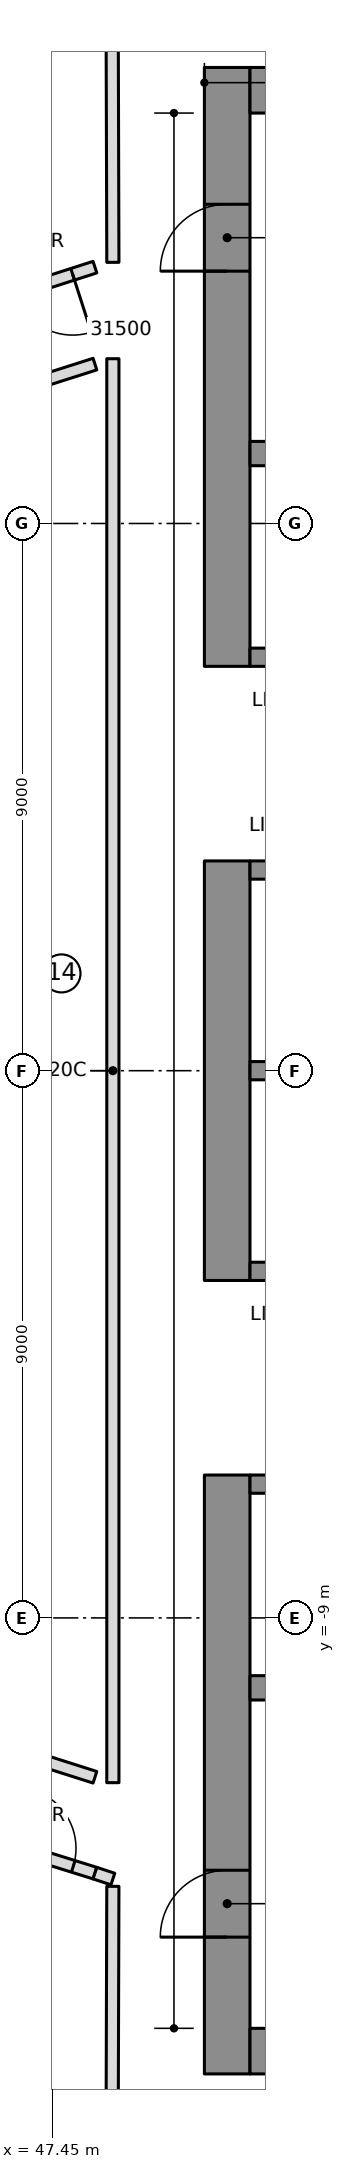
"""IFC4 building model, lengths in metres.
Left out: names, types, materials, properties, quantities, classifications, styles, units other than length and angle.
Written with IfcOpenShell. Run it as: python <this file> out.ifc"""

import sys

from ifc_helpers import new_model, si_unit, direction, frame, frame_2d, origin, place, context, subcontext, project, spatial, rectangle, extrude, element, fill, save


model = new_model("IFC4")
c1 = context("Model", 3, precision=1e-05, world=origin(), true_north=direction((0.0, 1.0)))
c2 = subcontext(c1, "Body", "Model", "MODEL_VIEW")
j1 = project(units=[si_unit("LENGTHUNIT", "METRE"), si_unit("PLANEANGLEUNIT", "RADIAN")], contexts=[c1])
p1 = place(None, origin())
s1 = spatial("IfcSite", under=j1, at=p1, CompositionType="ELEMENT")
p2 = place(p1, origin())
s2 = spatial("IfcBuilding", under=s1, at=p2, CompositionType="ELEMENT")
p3 = place(p2, frame((0.0, 0.0, 193.25)))
s3 = spatial("IfcBuildingStorey", under=s2, at=p3, CompositionType="ELEMENT", Elevation=193.25)
p4 = place(p3, frame((50.325, 6.65, 0.0), z_axis=(0.0, 0.0, 1.0), x_axis=(0.0, 1.0, 0.0)))
e1 = element("IfcWall", 1, at=p4, inside=s3, PredefinedType="SHEAR", context=c2, shape_type="SweptSolid", body=[
    extrude(rectangle(XDim=9.85, YDim=0.75, at=frame_2d((4.925, 0.0))), origin(), (0.0, 0.0, 1.0), 3.55),
])
p5 = place(p4, frame((6.5, 0.0, 0.0)))
e2 = element("IfcOpeningElement", 2, at=p5, cuts=e1, PredefinedType="OPENING", context=c2, shape_type="SweptSolid", body=[
    extrude(rectangle(XDim=1.1, YDim=2.1, at=frame_2d((0.55, 1.05))), frame((0.0, 0.385, 0.0), z_axis=(0.0, -1.0, 0.0), x_axis=(1.0, 0.0, 0.0)), (0.0, 0.0, 1.0), 0.77),
])
p6 = place(p3, frame((50.325, -3.45, 0.0), z_axis=(0.0, 0.0, 1.0), x_axis=(0.0, 1.0, 0.0)))
e3 = element("IfcWall", 3, at=p6, inside=s3, PredefinedType="SHEAR", context=c2, shape_type="SweptSolid", body=[
    extrude(rectangle(XDim=6.9, YDim=0.75, at=frame_2d((3.45, 0.0))), origin(), (0.0, 0.0, 1.0), 3.55),
])
p7 = place(p3, frame((50.325, -16.5, 0.0), z_axis=(0.0, 0.0, 1.0), x_axis=(0.0, 1.0, 0.0)))
e4 = element("IfcWall", 4, at=p7, inside=s3, PredefinedType="SHEAR", context=c2, shape_type="SweptSolid", body=[
    extrude(rectangle(XDim=9.85, YDim=0.75, at=frame_2d((4.925, 0.0))), origin(), (0.0, 0.0, 1.0), 3.55),
])
p8 = place(p7, frame((2.25, 0.0, 0.0)))
e5 = element("IfcOpeningElement", 5, at=p8, cuts=e4, PredefinedType="OPENING", context=c2, shape_type="SweptSolid", body=[
    extrude(rectangle(XDim=1.1, YDim=2.1, at=frame_2d((0.55, 1.05))), frame((0.0, 0.385, 0.0), z_axis=(0.0, -1.0, 0.0), x_axis=(1.0, 0.0, 0.0)), (0.0, 0.0, 1.0), 0.77),
])
for number, where, z_axis, x_axis in (
    (6, (50.7, 16.125, 0.0), (0.0, 0.0, 1.0), (1.0, 0.0, 0.0)),
    (7, (50.7, -16.125, 0.0), (0.0, 0.0, 1.0), (1.0, 0.0, 0.0)),
):
    element("IfcWall", number, at=place(p3, frame(where, z_axis=z_axis, x_axis=x_axis)), inside=s3, PredefinedType="SHEAR", context=c2, shape_type="SweptSolid", body=[
        extrude(rectangle(XDim=13.77, YDim=0.75, at=frame_2d((6.885, 0.0))), origin(), (0.0, 0.0, 1.0), 3.55),
    ])
p9 = place(p3, frame((50.7, 10.15, 0.0), z_axis=(0.0, 0.0, 1.0), x_axis=(1.0, 0.0, 0.0)))
e8 = element("IfcWall", 8, at=p9, inside=s3, PredefinedType="SHEAR", context=c2, shape_type="SweptSolid", body=[
    extrude(rectangle(XDim=13.02, YDim=0.4, at=frame_2d((6.51, 0.0))), origin(), (0.0, 0.0, 1.0), 3.55),
])
p10 = place(p9, frame((0.7, 0.0, 0.0)))
e9 = element("IfcOpeningElement", 9, at=p10, cuts=e8, PredefinedType="OPENING", context=c2, shape_type="SweptSolid", body=[
    extrude(rectangle(XDim=1.1, YDim=2.1, at=frame_2d((0.55, 1.05))), frame((0.0, 0.21, 0.0), z_axis=(0.0, -1.0, 0.0), x_axis=(1.0, 0.0, 0.0)), (0.0, 0.0, 1.0), 0.42),
])
p11 = place(p9, frame((3.5, 0.0, 0.0)))
e10 = element("IfcOpeningElement", 10, at=p11, cuts=e8, PredefinedType="OPENING", context=c2, shape_type="SweptSolid", body=[
    extrude(rectangle(XDim=1.1, YDim=2.1, at=frame_2d((0.55, 1.05))), frame((0.0, 0.21, 0.0), z_axis=(0.0, -1.0, 0.0), x_axis=(1.0, 0.0, 0.0)), (0.0, 0.0, 1.0), 0.42),
])
p12 = place(p3, frame((50.7, -10.15, 0.0), z_axis=(0.0, 0.0, 1.0), x_axis=(1.0, 0.0, 0.0)))
e11 = element("IfcWall", 11, at=p12, inside=s3, PredefinedType="SHEAR", context=c2, shape_type="SweptSolid", body=[
    extrude(rectangle(XDim=13.02, YDim=0.4, at=frame_2d((6.51, 0.0))), origin(), (0.0, 0.0, 1.0), 3.55),
])
p13 = place(p3, frame((50.7, 0.0, 0.0), z_axis=(0.0, 0.0, 1.0), x_axis=(1.0, 0.0, 0.0)))
e12 = element("IfcWall", 12, at=p13, inside=s3, PredefinedType="SHEAR", context=c2, shape_type="SweptSolid", body=[
    extrude(rectangle(XDim=10.9, YDim=0.3, at=frame_2d((5.45, 0.0))), origin(), (0.0, 0.0, 1.0), 3.55),
])
p14 = place(p3, frame((50.7, 3.3, 0.0), z_axis=(0.0, 0.0, 1.0), x_axis=(1.0, 0.0, 0.0)))
e13 = element("IfcWall", 13, at=p14, inside=s3, PredefinedType="SHEAR", context=c2, shape_type="SweptSolid", body=[
    extrude(rectangle(XDim=10.9, YDim=0.3, at=frame_2d((5.45, 0.0))), origin(), (0.0, 0.0, 1.0), 3.55),
])
p15 = place(p14, frame((0.7, 0.0, 0.0)))
e14 = element("IfcOpeningElement", 14, at=p15, cuts=e13, PredefinedType="OPENING", context=c2, shape_type="SweptSolid", body=[
    extrude(rectangle(XDim=1.1, YDim=2.1, at=frame_2d((0.55, 1.05))), frame((0.0, 0.16, 0.0), z_axis=(0.0, -1.0, 0.0), x_axis=(1.0, 0.0, 0.0)), (0.0, 0.0, 1.0), 0.32),
])
p16 = place(p14, frame((3.5, 0.0, 0.0)))
e15 = element("IfcOpeningElement", 15, at=p16, cuts=e13, PredefinedType="OPENING", context=c2, shape_type="SweptSolid", body=[
    extrude(rectangle(XDim=1.1, YDim=2.1, at=frame_2d((0.55, 1.05))), frame((0.0, 0.16, 0.0), z_axis=(0.0, -1.0, 0.0), x_axis=(1.0, 0.0, 0.0)), (0.0, 0.0, 1.0), 0.32),
])
p17 = place(p14, frame((6.3, 0.0, 0.0)))
e16 = element("IfcOpeningElement", 16, at=p17, cuts=e13, PredefinedType="OPENING", context=c2, shape_type="SweptSolid", body=[
    extrude(rectangle(XDim=1.1, YDim=2.1, at=frame_2d((0.55, 1.05))), frame((0.0, 0.16, 0.0), z_axis=(0.0, -1.0, 0.0), x_axis=(1.0, 0.0, 0.0)), (0.0, 0.0, 1.0), 0.32),
])
p18 = place(p14, frame((9.1, 0.0, 0.0)))
e17 = element("IfcOpeningElement", 17, at=p18, cuts=e13, PredefinedType="OPENING", context=c2, shape_type="SweptSolid", body=[
    extrude(rectangle(XDim=1.1, YDim=2.1, at=frame_2d((0.55, 1.05))), frame((0.0, 0.16, 0.0), z_axis=(0.0, -1.0, 0.0), x_axis=(1.0, 0.0, 0.0)), (0.0, 0.0, 1.0), 0.32),
])
p19 = place(p3, frame((50.7, 6.8, 0.0), z_axis=(0.0, 0.0, 1.0), x_axis=(1.0, 0.0, 0.0)))
e18 = element("IfcWall", 18, at=p19, inside=s3, PredefinedType="SHEAR", context=c2, shape_type="SweptSolid", body=[
    extrude(rectangle(XDim=10.9, YDim=0.3, at=frame_2d((5.45, 0.0))), origin(), (0.0, 0.0, 1.0), 3.55),
])
p20 = place(p19, frame((6.4, 0.0, 0.0)))
e19 = element("IfcOpeningElement", 19, at=p20, cuts=e18, PredefinedType="OPENING", context=c2, shape_type="SweptSolid", body=[
    extrude(rectangle(XDim=0.9, YDim=2.1, at=frame_2d((0.45, 1.05))), frame((0.0, 0.16, 0.0), z_axis=(0.0, -1.0, 0.0), x_axis=(1.0, 0.0, 0.0)), (0.0, 0.0, 1.0), 0.32),
])
p21 = place(p19, frame((9.2, 0.0, 0.0)))
e20 = element("IfcOpeningElement", 20, at=p21, cuts=e18, PredefinedType="OPENING", context=c2, shape_type="SweptSolid", body=[
    extrude(rectangle(XDim=0.9, YDim=2.1, at=frame_2d((0.45, 1.05))), frame((0.0, 0.16, 0.0), z_axis=(0.0, -1.0, 0.0), x_axis=(1.0, 0.0, 0.0)), (0.0, 0.0, 1.0), 0.32),
])
p22 = place(p3, frame((50.7, -3.3, 0.0), z_axis=(0.0, 0.0, 1.0), x_axis=(1.0, 0.0, 0.0)))
e21 = element("IfcWall", 21, at=p22, inside=s3, PredefinedType="SHEAR", context=c2, shape_type="SweptSolid", body=[
    extrude(rectangle(XDim=10.9, YDim=0.3, at=frame_2d((5.45, 0.0))), origin(), (0.0, 0.0, 1.0), 3.55),
])
p23 = place(p22, frame((9.1, 0.0, 0.0)))
e22 = element("IfcOpeningElement", 22, at=p23, cuts=e21, PredefinedType="OPENING", context=c2, shape_type="SweptSolid", body=[
    extrude(rectangle(XDim=1.1, YDim=2.1, at=frame_2d((0.55, 1.05))), frame((0.0, 0.16, 0.0), z_axis=(0.0, -1.0, 0.0), x_axis=(1.0, 0.0, 0.0)), (0.0, 0.0, 1.0), 0.32),
])
p24 = place(p3, frame((50.7, -6.8, 0.0), z_axis=(0.0, 0.0, 1.0), x_axis=(1.0, 0.0, 0.0)))
e23 = element("IfcWall", 23, at=p24, inside=s3, PredefinedType="SHEAR", context=c2, shape_type="SweptSolid", body=[
    extrude(rectangle(XDim=10.9, YDim=0.3, at=frame_2d((5.45, 0.0))), origin(), (0.0, 0.0, 1.0), 3.55),
])
p25 = place(p24, frame((6.3, 0.0, 0.0)))
e24 = element("IfcOpeningElement", 24, at=p25, cuts=e23, PredefinedType="OPENING", context=c2, shape_type="SweptSolid", body=[
    extrude(rectangle(XDim=1.1, YDim=2.1, at=frame_2d((0.55, 1.05))), frame((0.0, 0.16, 0.0), z_axis=(0.0, -1.0, 0.0), x_axis=(1.0, 0.0, 0.0)), (0.0, 0.0, 1.0), 0.32),
])
p26 = place(p24, frame((9.1, 0.0, 0.0)))
e25 = element("IfcOpeningElement", 25, at=p26, cuts=e23, PredefinedType="OPENING", context=c2, shape_type="SweptSolid", body=[
    extrude(rectangle(XDim=1.1, YDim=2.1, at=frame_2d((0.55, 1.05))), frame((0.0, 0.16, 0.0), z_axis=(0.0, -1.0, 0.0), x_axis=(1.0, 0.0, 0.0)), (0.0, 0.0, 1.0), 0.32),
])
p27 = place(p24, frame((0.8, 0.0, 0.0)))
e26 = element("IfcOpeningElement", 26, at=p27, cuts=e23, PredefinedType="OPENING", context=c2, shape_type="SweptSolid", body=[
    extrude(rectangle(XDim=0.9, YDim=2.1, at=frame_2d((0.45, 1.05))), frame((0.0, 0.16, 0.0), z_axis=(0.0, -1.0, 0.0), x_axis=(1.0, 0.0, 0.0)), (0.0, 0.0, 1.0), 0.32),
])
p28 = place(p24, frame((3.6, 0.0, 0.0)))
e27 = element("IfcOpeningElement", 27, at=p28, cuts=e23, PredefinedType="OPENING", context=c2, shape_type="SweptSolid", body=[
    extrude(rectangle(XDim=0.9, YDim=2.1, at=frame_2d((0.45, 1.05))), frame((0.0, 0.16, 0.0), z_axis=(0.0, -1.0, 0.0), x_axis=(1.0, 0.0, 0.0)), (0.0, 0.0, 1.0), 0.32),
])
p29 = place(p3, frame((48.15, 13.216, 0.0), z_axis=(0.0, 0.0, 1.0), x_axis=(-0.952101841283, -0.305781104428, 0.0)))
e28 = element("IfcWall", 28, at=p29, inside=s3, PredefinedType="PARTITIONING", context=c2, shape_type="SweptSolid", body=[
    extrude(rectangle(XDim=2.079, YDim=0.2, at=frame_2d((1.04, 0.0))), origin(), (0.0, 0.0, 1.0), 3.25),
])
p30 = place(p29, frame((0.385, 0.0, 0.0)))
e29 = element("IfcOpeningElement", 29, at=p30, cuts=e28, PredefinedType="OPENING", context=c2, shape_type="SweptSolid", body=[
    extrude(rectangle(XDim=1.0, YDim=2.1, at=frame_2d((0.5, 1.05))), frame((0.0, 0.11, 0.0), z_axis=(0.0, -1.0, 0.0), x_axis=(1.0, 0.0, 0.0)), (0.0, 0.0, 1.0), 0.22),
])
p31 = place(p3, frame((46.17, -12.58, 0.0), z_axis=(0.0, 0.0, 1.0), x_axis=(0.954639063921, -0.297765440634, 0.0)))
e30 = element("IfcWall", 30, at=p31, inside=s3, PredefinedType="PARTITIONING", context=c2, shape_type="SweptSolid", body=[
    extrude(rectangle(XDim=2.073, YDim=0.2, at=frame_2d((1.037, 0.0))), origin(), (0.0, 0.0, 1.0), 3.25),
])
p32 = place(p31, frame((0.7, 0.0, 0.0)))
e31 = element("IfcOpeningElement", 31, at=p32, cuts=e30, PredefinedType="OPENING", context=c2, shape_type="SweptSolid", body=[
    extrude(rectangle(XDim=1.0, YDim=2.1, at=frame_2d((0.5, 1.05))), frame((0.0, 0.11, 0.0), z_axis=(0.0, -1.0, 0.0), x_axis=(1.0, 0.0, 0.0)), (0.0, 0.0, 1.0), 0.22),
])
for number, where, z_axis, x_axis in (
    (32, (46.881, 11.217, 0.0), (0.0, 0.0, 1.0), (0.953, 0.304, 0.0)),
    (33, (48.15, -11.621, 0.0), (0.0, 0.0, 1.0), (-0.953, 0.304, 0.0)),
):
    element("IfcWall", number, at=place(p3, frame(where, z_axis=z_axis, x_axis=x_axis)), inside=s3, PredefinedType="PARTITIONING", context=c2, shape_type="SweptSolid", body=[
        extrude(rectangle(XDim=1.332, YDim=0.2, at=frame_2d((0.666, 0.0))), origin(), (0.0, 0.0, 1.0), 3.25),
    ])
p33 = place(p3, frame((48.445, 11.71, 0.0), z_axis=(0.0, 0.0, 1.0), x_axis=(0.0, -1.0, 0.0)))
e34 = element("IfcWall", 34, at=p33, inside=s3, PredefinedType="PARTITIONING", context=c2, shape_type="SweptSolid", body=[
    extrude(rectangle(XDim=23.42, YDim=0.2, at=frame_2d((11.71, 0.0))), origin(), (0.0, 0.0, 1.0), 3.25),
])
p34 = place(p3, frame((48.429, 18.816, 0.0), z_axis=(0.0, 0.0, 1.0), x_axis=(0.002918533604, -0.999995741072, 0.0)))
e35 = element("IfcWall", 35, at=p34, inside=s3, PredefinedType="PARTITIONING", context=c2, shape_type="SweptSolid", body=[
    extrude(rectangle(XDim=5.521, YDim=0.2, at=frame_2d((2.76, 0.0))), origin(), (0.0, 0.0, 1.0), 3.25),
])
p35 = place(p3, frame((48.15, -13.198, 0.0), z_axis=(0.0, 0.0, 1.0), x_axis=(0.949621636458, -0.313398703843, 0.0)))
e36 = element("IfcWall", 36, at=p35, inside=s3, PredefinedType="PARTITIONING", context=c2, shape_type="SweptSolid", body=[
    extrude(rectangle(XDim=0.311, YDim=0.2, at=frame_2d((0.155, 0.0))), origin(), (0.0, 0.0, 1.0), 3.25),
])
p36 = place(p3, frame((48.445, -13.415, 0.0), z_axis=(0.0, 0.0, 1.0), x_axis=(-0.002938106018, -0.999995683757, 0.0)))
e37 = element("IfcWall", 37, at=p36, inside=s3, PredefinedType="PARTITIONING", context=c2, shape_type="SweptSolid", body=[
    extrude(rectangle(XDim=5.401, YDim=0.2, at=frame_2d((2.701, 0.0))), origin(), (0.0, 0.0, 1.0), 3.25),
])
p37 = place(p30, origin())
e38 = element("IfcDoor", 38, at=p37, inside=s3, OperationType="SINGLE_SWING_RIGHT", PredefinedType="DOOR", context=c2, shape_type="SweptSolid", body=[
    extrude(rectangle(XDim=1.0, YDim=2.1, at=frame_2d((0.5, 1.05))), frame((0.0, 0.025, 0.0), z_axis=(0.0, -1.0, 0.0), x_axis=(1.0, 0.0, 0.0)), (0.0, 0.0, 1.0), 0.05),
])
fill(e29, e38)
p38 = place(p32, origin())
e39 = element("IfcDoor", 39, at=p38, inside=s3, OperationType="SINGLE_SWING_RIGHT", PredefinedType="DOOR", context=c2, shape_type="SweptSolid", body=[
    extrude(rectangle(XDim=1.0, YDim=2.1, at=frame_2d((0.5, 1.05))), frame((0.0, 0.025, 0.0), z_axis=(0.0, -1.0, 0.0), x_axis=(1.0, 0.0, 0.0)), (0.0, 0.0, 1.0), 0.05),
])
fill(e31, e39)
p39 = place(p5, origin())
e40 = element("IfcDoor", 40, at=p39, inside=s3, OperationType="SINGLE_SWING_RIGHT", PredefinedType="DOOR", context=c2, shape_type="SweptSolid", body=[
    extrude(rectangle(XDim=1.1, YDim=2.1, at=frame_2d((0.55, 1.05))), frame((0.0, 0.025, 0.0), z_axis=(0.0, -1.0, 0.0), x_axis=(1.0, 0.0, 0.0)), (0.0, 0.0, 1.0), 0.05),
])
fill(e2, e40)
p40 = place(p8, origin())
e41 = element("IfcDoor", 41, at=p40, inside=s3, OperationType="SINGLE_SWING_RIGHT", PredefinedType="DOOR", context=c2, shape_type="SweptSolid", body=[
    extrude(rectangle(XDim=1.1, YDim=2.1, at=frame_2d((0.55, 1.05))), frame((0.0, 0.025, 0.0), z_axis=(0.0, -1.0, 0.0), x_axis=(1.0, 0.0, 0.0)), (0.0, 0.0, 1.0), 0.05),
])
fill(e5, e41)
save(model, sys.argv[1])
